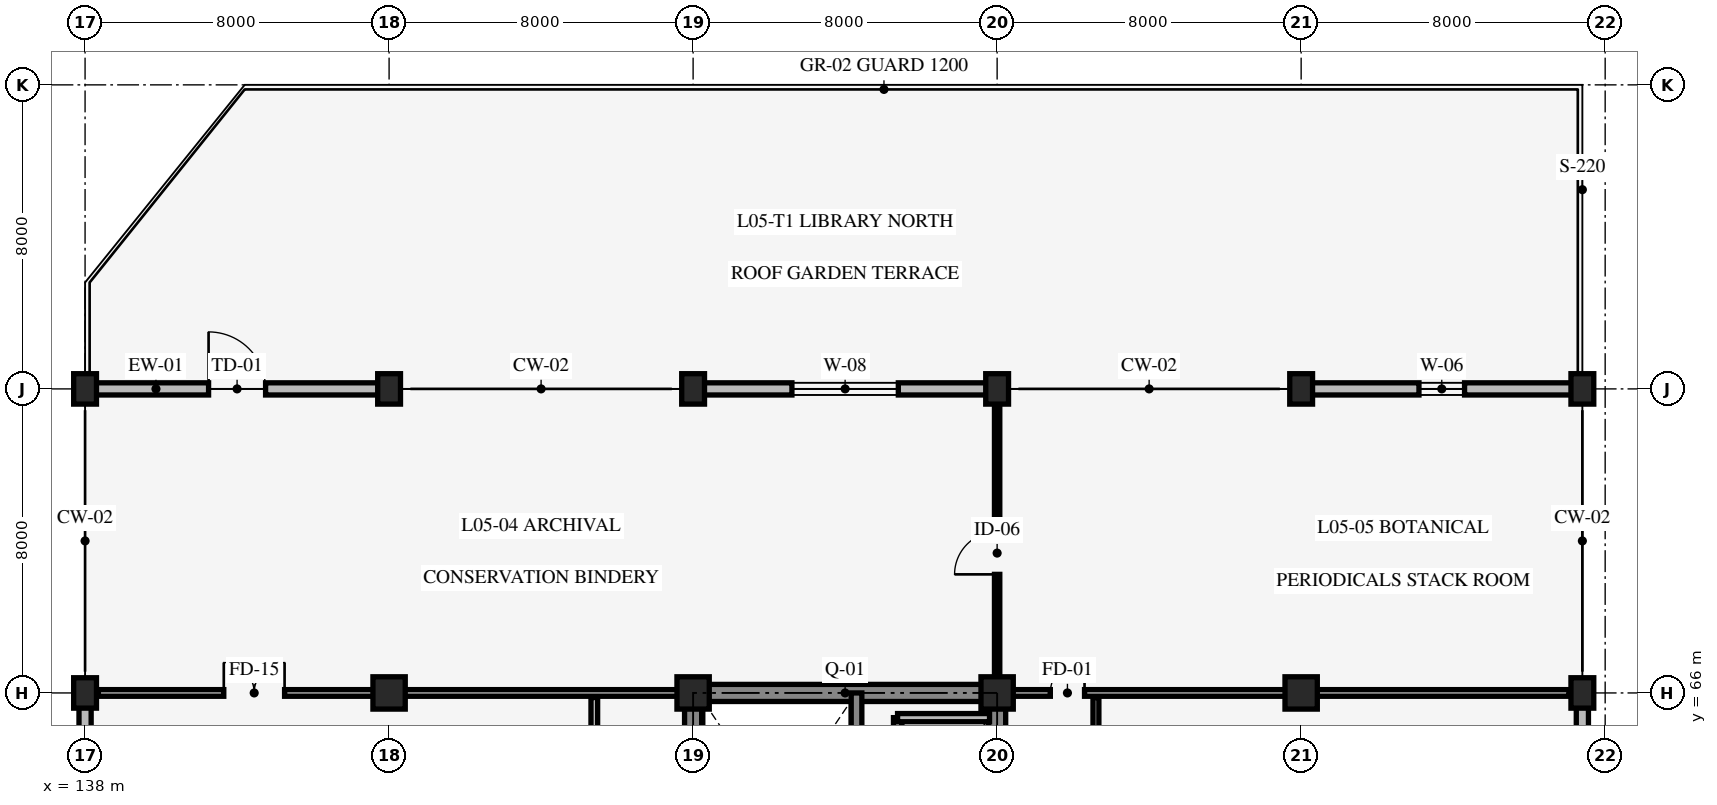
"""IFC4 building model, lengths in metres.
Left out: names, types, materials, properties, quantities, classifications, styles, units other than length and angle.
Written with IfcOpenShell. Run it as: python <this file> out.ifc"""

import sys

from ifc_helpers import new_model, si_unit, direction, frame, frame_2d, origin, origin_2d, place, context, subcontext, project, spatial, rectangle, extrude, element, fill, save


model = new_model("IFC4")
c1 = context("Model", 3, precision=1e-05, world=origin(), true_north=direction((0.0, 1.0)))
c2 = subcontext(c1, "Body", "Model", "MODEL_VIEW")
j1 = project(units=[si_unit("LENGTHUNIT", "METRE"), si_unit("PLANEANGLEUNIT", "RADIAN")], contexts=[c1])
p1 = place(None, origin())
s1 = spatial("IfcSite", under=j1, at=p1, CompositionType="ELEMENT")
p2 = place(p1, origin())
s2 = spatial("IfcBuilding", under=s1, at=p2, CompositionType="ELEMENT")
p3 = place(p2, frame((0.0, 0.0, 19.2)))
s3 = spatial("IfcBuildingStorey", under=s2, at=p3, CompositionType="ELEMENT", Elevation=19.2)
p4 = place(p3, frame((162.0, 58.0, 0.0), z_axis=(0.0, 0.0, 1.0), x_axis=(0.0, 1.0, 0.0)))
e1 = element("IfcWall", 1, at=p4, inside=s3, PredefinedType="SHEAR", context=c2, shape_type="SweptSolid", body=[
    extrude(rectangle(XDim=8.0, YDim=0.45, at=frame_2d((4.0, 0.0))), origin(), (0.0, 0.0, 1.0), 3.95),
])
p5 = place(p4, frame((3.275, 0.0, 0.0)))
e2 = element("IfcOpeningElement", 2, at=p5, cuts=e1, PredefinedType="OPENING", context=c2, shape_type="SweptSolid", body=[
    extrude(rectangle(XDim=1.05, YDim=2.2, at=frame_2d((0.525, 1.1))), frame((0.0, 0.235, 0.0), z_axis=(0.0, -1.0, 0.0), x_axis=(1.0, 0.0, 0.0)), (0.0, 0.0, 1.0), 0.47),
])
p6 = place(p4, frame((5.45, 0.0, 0.0)))
e3 = element("IfcOpeningElement", 3, at=p6, cuts=e1, PredefinedType="OPENING", context=c2, shape_type="SweptSolid", body=[
    extrude(rectangle(XDim=1.4, YDim=2.3, at=frame_2d((0.7, 1.15))), frame((0.0, 0.235, 0.0), z_axis=(0.0, -1.0, 0.0), x_axis=(1.0, 0.0, 0.0)), (0.0, 0.0, 1.0), 0.47),
])
for number, where, z_axis, x_axis in (
    (4, (162.0, 66.0, 0.0), (0.0, 0.0, 1.0), (-1.0, 0.0, 0.0)),
    (5, (154.0, 66.0, 0.0), (0.0, 0.0, 1.0), (0.0, -1.0, 0.0)),
):
    element("IfcWall", number, at=place(p3, frame(where, z_axis=z_axis, x_axis=x_axis)), inside=s3, PredefinedType="SHEAR", context=c2, shape_type="SweptSolid", body=[
        extrude(rectangle(XDim=8.0, YDim=0.45, at=frame_2d((4.0, 0.0))), origin(), (0.0, 0.0, 1.0), 3.95),
    ])
p7 = place(p3, frame((158.3, 58.0, 0.0), z_axis=(0.0, 0.0, 1.0), x_axis=(0.0, 1.0, 0.0)))
e6 = element("IfcWall", 6, at=p7, inside=s3, PredefinedType="SHEAR", context=c2, shape_type="SweptSolid", body=[
    extrude(rectangle(XDim=8.0, YDim=0.28, at=frame_2d((4.0, 0.0))), origin(), (0.0, 0.0, 1.0), 3.95),
])
for number, where, z_axis, x_axis in (
    (7, (138.0, 66.0, 0.0), (0.0, 0.0, 1.0), (1.0, 0.0, 0.0)),
    (8, (138.0, 74.0, 0.0), (0.0, 0.0, 1.0), (1.0, 0.0, 0.0)),
):
    element("IfcColumn", number, at=place(p3, frame(where, z_axis=z_axis, x_axis=x_axis)), inside=s3, PredefinedType="COLUMN", context=c2, shape_type="SweptSolid", body=[
        extrude(rectangle(XDim=0.6, YDim=0.8, at=origin_2d()), origin(), (0.0, 0.0, 1.0), 4.2),
    ])
p8 = place(p3, frame((146.0, 66.0, 0.0), z_axis=(0.0, 0.0, 1.0), x_axis=(1.0, 0.0, 0.0)))
e9 = element("IfcColumn", 9, at=p8, inside=s3, PredefinedType="COLUMN", context=c2, shape_type="SweptSolid", body=[
    extrude(rectangle(XDim=0.85, YDim=0.85, at=origin_2d()), origin(), (0.0, 0.0, 1.0), 4.2),
])
p9 = place(p3, frame((146.0, 74.0, 0.0), z_axis=(0.0, 0.0, 1.0), x_axis=(1.0, 0.0, 0.0)))
e10 = element("IfcColumn", 10, at=p9, inside=s3, PredefinedType="COLUMN", context=c2, shape_type="SweptSolid", body=[
    extrude(rectangle(XDim=0.6, YDim=0.8, at=origin_2d()), origin(), (0.0, 0.0, 1.0), 4.2),
])
p10 = place(p3, frame((154.0, 66.0, 0.0), z_axis=(0.0, 0.0, 1.0), x_axis=(1.0, 0.0, 0.0)))
e11 = element("IfcColumn", 11, at=p10, inside=s3, PredefinedType="COLUMN", context=c2, shape_type="SweptSolid", body=[
    extrude(rectangle(XDim=0.85, YDim=0.85, at=origin_2d()), origin(), (0.0, 0.0, 1.0), 4.2),
])
p11 = place(p3, frame((154.0, 74.0, 0.0), z_axis=(0.0, 0.0, 1.0), x_axis=(1.0, 0.0, 0.0)))
e12 = element("IfcColumn", 12, at=p11, inside=s3, PredefinedType="COLUMN", context=c2, shape_type="SweptSolid", body=[
    extrude(rectangle(XDim=0.6, YDim=0.8, at=origin_2d()), origin(), (0.0, 0.0, 1.0), 4.2),
])
p12 = place(p3, frame((162.0, 66.0, 0.0), z_axis=(0.0, 0.0, 1.0), x_axis=(1.0, 0.0, 0.0)))
e13 = element("IfcColumn", 13, at=p12, inside=s3, PredefinedType="COLUMN", context=c2, shape_type="SweptSolid", body=[
    extrude(rectangle(XDim=0.85, YDim=0.85, at=origin_2d()), origin(), (0.0, 0.0, 1.0), 4.2),
])
p13 = place(p3, frame((162.0, 74.0, 0.0), z_axis=(0.0, 0.0, 1.0), x_axis=(1.0, 0.0, 0.0)))
e14 = element("IfcColumn", 14, at=p13, inside=s3, PredefinedType="COLUMN", context=c2, shape_type="SweptSolid", body=[
    extrude(rectangle(XDim=0.6, YDim=0.8, at=origin_2d()), origin(), (0.0, 0.0, 1.0), 4.2),
])
p14 = place(p3, frame((170.0, 66.0, 0.0), z_axis=(0.0, 0.0, 1.0), x_axis=(1.0, 0.0, 0.0)))
e15 = element("IfcColumn", 15, at=p14, inside=s3, PredefinedType="COLUMN", context=c2, shape_type="SweptSolid", body=[
    extrude(rectangle(XDim=0.85, YDim=0.85, at=origin_2d()), origin(), (0.0, 0.0, 1.0), 4.2),
])
for number, where, z_axis, x_axis in (
    (16, (170.0, 74.0, 0.0), (0.0, 0.0, 1.0), (1.0, 0.0, 0.0)),
    (17, (177.4, 66.0, 0.0), (0.0, 0.0, 1.0), (1.0, 0.0, 0.0)),
    (18, (177.4, 74.0, 0.0), (0.0, 0.0, 1.0), (1.0, 0.0, 0.0)),
):
    element("IfcColumn", number, at=place(p3, frame(where, z_axis=z_axis, x_axis=x_axis)), inside=s3, PredefinedType="COLUMN", context=c2, shape_type="SweptSolid", body=[
        extrude(rectangle(XDim=0.6, YDim=0.8, at=origin_2d()), origin(), (0.0, 0.0, 1.0), 4.2),
    ])
p15 = place(p3, frame((138.0, 58.0, 0.0), z_axis=(0.0, 0.0, 1.0), x_axis=(0.0, 1.0, 0.0)))
e19 = element("IfcWall", 19, at=p15, inside=s3, PredefinedType="STANDARD", context=c2, shape_type="SweptSolid", body=[
    extrude(rectangle(XDim=8.0, YDim=0.32, at=frame_2d((4.0, 0.0))), origin(), (0.0, 0.0, 1.0), 3.19),
])
p16 = place(p15, frame((2.5, 0.0, 0.85)))
e20 = element("IfcOpeningElement", 20, at=p16, cuts=e19, PredefinedType="OPENING", context=c2, shape_type="SweptSolid", body=[
    extrude(rectangle(XDim=3.0, YDim=1.8, at=frame_2d((1.5, 0.9))), frame((0.0, 0.17, 0.0), z_axis=(0.0, -1.0, 0.0), x_axis=(1.0, 0.0, 0.0)), (0.0, 0.0, 1.0), 0.34),
])
p17 = place(p3, frame((138.0, 74.0, 0.0), z_axis=(0.0, 0.0, 1.0), x_axis=(1.0, 0.0, 0.0)))
e21 = element("IfcWall", 21, at=p17, inside=s3, PredefinedType="STANDARD", context=c2, shape_type="SweptSolid", body=[
    extrude(rectangle(XDim=8.0, YDim=0.32, at=frame_2d((4.0, 0.0))), origin(), (0.0, 0.0, 1.0), 3.19),
])
p18 = place(p17, frame((3.25, 0.0, 0.0)))
e22 = element("IfcOpeningElement", 22, at=p18, cuts=e21, PredefinedType="OPENING", context=c2, shape_type="SweptSolid", body=[
    extrude(rectangle(XDim=1.5, YDim=2.25, at=frame_2d((0.75, 1.125))), frame((0.0, 0.17, 0.0), z_axis=(0.0, -1.0, 0.0), x_axis=(1.0, 0.0, 0.0)), (0.0, 0.0, 1.0), 0.34),
])
p19 = place(p3, frame((154.0, 74.0, 0.0), z_axis=(0.0, 0.0, 1.0), x_axis=(1.0, 0.0, 0.0)))
e23 = element("IfcWall", 23, at=p19, inside=s3, PredefinedType="STANDARD", context=c2, shape_type="SweptSolid", body=[
    extrude(rectangle(XDim=8.0, YDim=0.32, at=frame_2d((4.0, 0.0))), origin(), (0.0, 0.0, 1.0), 3.14),
])
p20 = place(p19, frame((2.6, 0.0, 0.85)))
e24 = element("IfcOpeningElement", 24, at=p20, cuts=e23, PredefinedType="OPENING", context=c2, shape_type="SweptSolid", body=[
    extrude(rectangle(XDim=2.8, YDim=1.6, at=frame_2d((1.4, 0.8))), frame((0.0, 0.17, 0.0), z_axis=(0.0, -1.0, 0.0), x_axis=(1.0, 0.0, 0.0)), (0.0, 0.0, 1.0), 0.34),
])
p21 = place(p3, frame((170.0, 74.0, 0.0), z_axis=(0.0, 0.0, 1.0), x_axis=(1.0, 0.0, 0.0)))
e25 = element("IfcWall", 25, at=p21, inside=s3, PredefinedType="STANDARD", context=c2, shape_type="SweptSolid", body=[
    extrude(rectangle(XDim=7.4, YDim=0.32, at=frame_2d((3.7, 0.0))), origin(), (0.0, 0.0, 1.0), 3.14),
])
p22 = place(p21, frame((3.1, 0.0, 0.85)))
e26 = element("IfcOpeningElement", 26, at=p22, cuts=e25, PredefinedType="OPENING", context=c2, shape_type="SweptSolid", body=[
    extrude(rectangle(XDim=1.2, YDim=1.2, at=frame_2d((0.6, 0.6))), frame((0.0, 0.17, 0.0), z_axis=(0.0, -1.0, 0.0), x_axis=(1.0, 0.0, 0.0)), (0.0, 0.0, 1.0), 0.34),
])
p23 = place(p3, frame((177.4, 66.0, 0.0), z_axis=(0.0, 0.0, 1.0), x_axis=(0.0, -1.0, 0.0)))
e27 = element("IfcWall", 27, at=p23, inside=s3, PredefinedType="STANDARD", context=c2, shape_type="SweptSolid", body=[
    extrude(rectangle(XDim=8.0, YDim=0.32, at=frame_2d((4.0, 0.0))), origin(), (0.0, 0.0, 1.0), 3.19),
])
p24 = place(p23, frame((2.9, 0.0, 0.85)))
e28 = element("IfcOpeningElement", 28, at=p24, cuts=e27, PredefinedType="OPENING", context=c2, shape_type="SweptSolid", body=[
    extrude(rectangle(XDim=2.2, YDim=1.4, at=frame_2d((1.1, 0.7))), frame((0.0, 0.17, 0.0), z_axis=(0.0, -1.0, 0.0), x_axis=(1.0, 0.0, 0.0)), (0.0, 0.0, 1.0), 0.34),
])
p25 = place(p3, frame((159.38, 62.9, 0.0), z_axis=(0.0, 0.0, 1.0), x_axis=(0.0, 1.0, 0.0)))
e29 = element("IfcWall", 29, at=p25, inside=s3, PredefinedType="STANDARD", context=c2, shape_type="SweptSolid", body=[
    extrude(rectangle(XDim=2.45, YDim=0.215, at=frame_2d((1.225, 0.0))), origin(), (0.0, 0.0, 1.0), 3.9),
])
p26 = place(p3, frame((159.38, 65.35, 0.0), z_axis=(0.0, 0.0, 1.0), x_axis=(1.0, 0.0, 0.0)))
e30 = element("IfcWall", 30, at=p26, inside=s3, PredefinedType="STANDARD", context=c2, shape_type="SweptSolid", body=[
    extrude(rectangle(XDim=2.42, YDim=0.215, at=frame_2d((1.21, 0.0))), origin(), (0.0, 0.0, 1.0), 3.9),
])
p27 = place(p3, frame((151.4, 42.12, 0.0), z_axis=(0.0, 0.0, 1.0), x_axis=(0.0, 1.0, 0.0)))
e31 = element("IfcWall", 31, at=p27, inside=s3, PredefinedType="STANDARD", context=c2, shape_type="SweptSolid", body=[
    extrude(rectangle(XDim=23.76, YDim=0.175, at=frame_2d((11.88, 0.0))), origin(), (0.0, 0.0, 1.0), 3.9),
])
p28 = place(p27, frame((11.28, 0.0, 0.0)))
e32 = element("IfcOpeningElement", 32, at=p28, cuts=e31, PredefinedType="OPENING", context=c2, shape_type="SweptSolid", body=[
    extrude(rectangle(XDim=1.2, YDim=2.1, at=frame_2d((0.6, 1.05))), frame((0.0, 0.098, 0.0), z_axis=(0.0, -1.0, 0.0), x_axis=(1.0, 0.0, 0.0)), (0.0, 0.0, 1.0), 0.195),
])
p29 = place(p3, frame((164.6, 58.08, 0.0), z_axis=(0.0, 0.0, 1.0), x_axis=(0.0, 1.0, 0.0)))
e33 = element("IfcWall", 33, at=p29, inside=s3, PredefinedType="STANDARD", context=c2, shape_type="SweptSolid", body=[
    extrude(rectangle(XDim=7.8, YDim=0.155, at=frame_2d((3.9, 0.0))), origin(), (0.0, 0.0, 1.0), 3.9),
])
p30 = place(p29, frame((3.15, 0.0, 0.0)))
e34 = element("IfcOpeningElement", 34, at=p30, cuts=e33, PredefinedType="OPENING", context=c2, shape_type="SweptSolid", body=[
    extrude(rectangle(XDim=1.5, YDim=2.2, at=frame_2d((0.75, 1.1))), frame((0.0, 0.087, 0.0), z_axis=(0.0, -1.0, 0.0), x_axis=(1.0, 0.0, 0.0)), (0.0, 0.0, 1.0), 0.175),
])
p31 = place(p3, frame((138.35, 66.0, 0.0), z_axis=(0.0, 0.0, 1.0), x_axis=(1.0, 0.0, 0.0)))
e35 = element("IfcWall", 35, at=p31, inside=s3, PredefinedType="STANDARD", context=c2, shape_type="SweptSolid", body=[
    extrude(rectangle(XDim=15.3, YDim=0.175, at=frame_2d((7.65, 0.0))), origin(), (0.0, 0.0, 1.0), 3.14),
])
p32 = place(p31, frame((3.3, 0.0, 0.0)))
e36 = element("IfcOpeningElement", 36, at=p32, cuts=e35, PredefinedType="OPENING", context=c2, shape_type="SweptSolid", body=[
    extrude(rectangle(XDim=1.6, YDim=2.25, at=frame_2d((0.8, 1.125))), frame((0.0, 0.098, 0.0), z_axis=(0.0, -1.0, 0.0), x_axis=(1.0, 0.0, 0.0)), (0.0, 0.0, 1.0), 0.195),
])
p33 = place(p3, frame((162.0, 66.12, 0.0), z_axis=(0.0, 0.0, 1.0), x_axis=(0.0, 1.0, 0.0)))
e37 = element("IfcWall", 37, at=p33, inside=s3, PredefinedType="STANDARD", context=c2, shape_type="SweptSolid", body=[
    extrude(rectangle(XDim=7.83, YDim=0.14, at=frame_2d((3.915, 0.0))), origin(), (0.0, 0.0, 1.0), 3.19),
])
p34 = place(p33, frame((3.0, 0.0, 0.0)))
e38 = element("IfcOpeningElement", 38, at=p34, cuts=e37, PredefinedType="OPENING", context=c2, shape_type="SweptSolid", body=[
    extrude(rectangle(XDim=1.12, YDim=2.12, at=frame_2d((0.56, 1.06))), frame((0.0, 0.08, 0.0), z_axis=(0.0, -1.0, 0.0), x_axis=(1.0, 0.0, 0.0)), (0.0, 0.0, 1.0), 0.16),
])
p35 = place(p3, frame((162.35, 66.0, 0.0), z_axis=(0.0, 0.0, 1.0), x_axis=(1.0, 0.0, 0.0)))
e39 = element("IfcWall", 39, at=p35, inside=s3, PredefinedType="STANDARD", context=c2, shape_type="SweptSolid", body=[
    extrude(rectangle(XDim=14.7, YDim=0.175, at=frame_2d((7.35, 0.0))), origin(), (0.0, 0.0, 1.0), 3.14),
])
p36 = place(p35, frame((1.05, 0.0, 0.0)))
e40 = element("IfcOpeningElement", 40, at=p36, cuts=e39, PredefinedType="OPENING", context=c2, shape_type="SweptSolid", body=[
    extrude(rectangle(XDim=0.9, YDim=2.1, at=frame_2d((0.45, 1.05))), frame((0.0, 0.098, 0.0), z_axis=(0.0, -1.0, 0.0), x_axis=(1.0, 0.0, 0.0)), (0.0, 0.0, 1.0), 0.195),
])
p37 = place(p18, origin())
e41 = element("IfcDoor", 41, at=p37, inside=s3, OperationType="SINGLE_SWING_LEFT", PredefinedType="DOOR", context=c2, shape_type="SweptSolid", body=[
    extrude(rectangle(XDim=1.5, YDim=2.25, at=frame_2d((0.75, 1.125))), frame((0.0, 0.025, 0.0), z_axis=(0.0, -1.0, 0.0), x_axis=(1.0, 0.0, 0.0)), (0.0, 0.0, 1.0), 0.05),
])
fill(e22, e41)
p38 = place(p20, origin())
e42 = element("IfcWindow", 42, at=p38, inside=s3, PartitioningType="SINGLE_PANEL", PredefinedType="WINDOW", context=c2, shape_type="SweptSolid", body=[
    extrude(rectangle(XDim=2.8, YDim=1.6, at=frame_2d((1.4, 0.8))), frame((0.0, 0.03, 0.0), z_axis=(0.0, -1.0, 0.0), x_axis=(1.0, 0.0, 0.0)), (0.0, 0.0, 1.0), 0.06),
])
fill(e24, e42)
p39 = place(p22, origin())
e43 = element("IfcWindow", 43, at=p39, inside=s3, PartitioningType="SINGLE_PANEL", PredefinedType="WINDOW", context=c2, shape_type="SweptSolid", body=[
    extrude(rectangle(XDim=1.2, YDim=1.2, at=frame_2d((0.6, 0.6))), frame((0.0, 0.03, 0.0), z_axis=(0.0, -1.0, 0.0), x_axis=(1.0, 0.0, 0.0)), (0.0, 0.0, 1.0), 0.06),
])
fill(e26, e43)
p40 = place(p32, origin())
e44 = element("IfcDoor", 44, at=p40, inside=s3, OperationType="DOUBLE_DOOR_SINGLE_SWING", PredefinedType="DOOR", context=c2, shape_type="SweptSolid", body=[
    extrude(rectangle(XDim=1.6, YDim=2.25, at=frame_2d((0.8, 1.125))), frame((0.0, 0.025, 0.0), z_axis=(0.0, -1.0, 0.0), x_axis=(1.0, 0.0, 0.0)), (0.0, 0.0, 1.0), 0.05),
])
fill(e36, e44)
p41 = place(p34, origin())
e45 = element("IfcDoor", 45, at=p41, inside=s3, OperationType="SINGLE_SWING_LEFT", PredefinedType="DOOR", context=c2, shape_type="SweptSolid", body=[
    extrude(rectangle(XDim=1.12, YDim=2.12, at=frame_2d((0.56, 1.06))), frame((0.0, 0.025, 0.0), z_axis=(0.0, -1.0, 0.0), x_axis=(1.0, 0.0, 0.0)), (0.0, 0.0, 1.0), 0.05),
])
fill(e38, e45)
p42 = place(p36, origin())
e46 = element("IfcDoor", 46, at=p42, inside=s3, OperationType="SINGLE_SWING_RIGHT", PredefinedType="DOOR", context=c2, shape_type="SweptSolid", body=[
    extrude(rectangle(XDim=0.9, YDim=2.1, at=frame_2d((0.45, 1.05))), frame((0.0, 0.025, 0.0), z_axis=(0.0, -1.0, 0.0), x_axis=(1.0, 0.0, 0.0)), (0.0, 0.0, 1.0), 0.05),
])
fill(e40, e46)
save(model, sys.argv[1])
